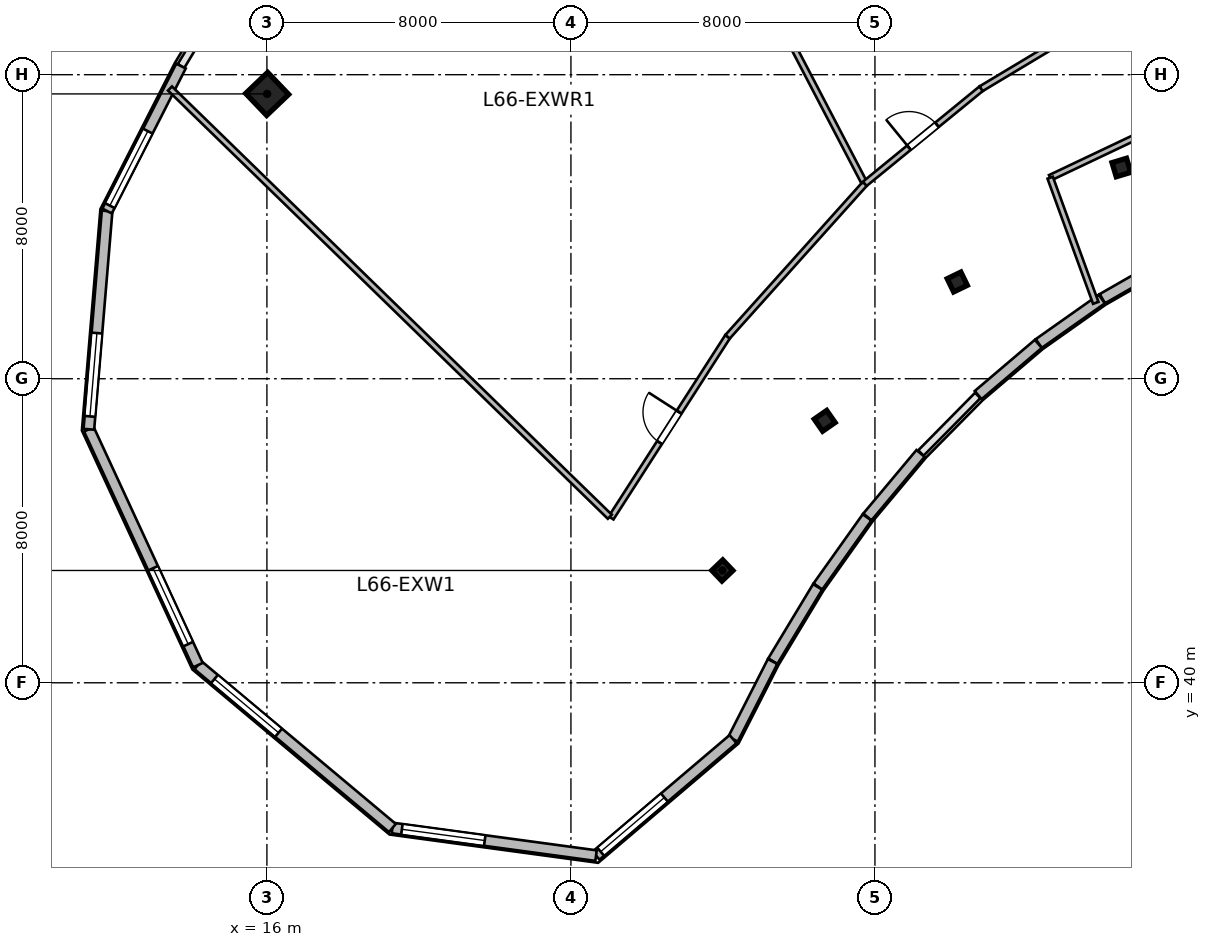
"""IFC4 building model, lengths in metres.
Left out: names, types, materials, properties, quantities, classifications, styles, units other than length and angle.
Written with IfcOpenShell. Run it as: python <this file> out.ifc"""

import sys

from ifc_helpers import new_model, si_unit, direction, frame, frame_2d, origin, origin_2d, place, context, subcontext, project, spatial, rectangle, i_section, extrude, source, transform, mapped, element, fill, save


model = new_model("IFC4")
c1 = context("Model", 3, precision=1e-05, world=origin(), true_north=direction((0.0, 1.0)))
c2 = subcontext(c1, "Body", "Model", "MODEL_VIEW")
j1 = project(units=[si_unit("LENGTHUNIT", "METRE"), si_unit("PLANEANGLEUNIT", "RADIAN")], contexts=[c1])
p1 = place(None, origin())
s1 = spatial("IfcSite", under=j1, at=p1, CompositionType="ELEMENT")
p2 = place(p1, origin())
s2 = spatial("IfcBuilding", under=s1, at=p2, CompositionType="ELEMENT")
p3 = place(p2, frame((0.0, 0.0, 271.8)))
s3 = spatial("IfcBuildingStorey", under=s2, at=p3, CompositionType="ELEMENT", Elevation=271.8)
m1 = source(origin(), c2, "Body", "SweptSolid", [
    extrude(i_section(OverallWidth=0.399, OverallDepth=0.387, WebThickness=0.021, FlangeThickness=0.033, at=origin_2d()), origin(), (0.0, 0.0, 1.0), 3.9),
])
p4 = place(p3, frame((27.985, 42.955, 0.0), z_axis=(0.0, 0.0, 1.0), x_axis=(-0.690756218984, 0.723087716626, 0.0)))
e1 = element("IfcColumn", 1, at=p4, inside=s3, PredefinedType="COLUMN", context=c2, shape_type="MappedRepresentation", body=[
    mapped(m1, transform((0.0, 0.0, 0.0), scale=1.0)),
])
m2 = source(origin(), c2, "Body", "SweptSolid", [
    extrude(rectangle(XDim=0.8, YDim=0.8, at=origin_2d()), origin(), (0.0, 0.0, 1.0), 3.9),
])
p5 = place(p3, frame((16.007, 55.494, 0.0), z_axis=(0.0, 0.0, 1.0), x_axis=(-0.690756218984, 0.723087716626, 0.0)))
e2 = element("IfcColumn", 2, at=p5, inside=s3, PredefinedType="COLUMN", context=c2, shape_type="MappedRepresentation", body=[
    mapped(m2, transform((0.0, 0.0, 0.0), scale=1.0)),
])
for number, where, z_axis, x_axis in (
    (3, (30.677, 46.892, 0.0), (0.0, 0.0, 1.0), (-0.571, 0.821, 0.0)),
    (4, (34.166, 50.545, 0.0), (0.0, 0.0, 1.0), (-0.436, 0.9, 0.0)),
    (5, (38.485, 53.558, 0.0), (0.0, 0.0, 1.0), (-0.289, 0.957, 0.0)),
):
    element("IfcColumn", number, at=place(p3, frame(where, z_axis=z_axis, x_axis=x_axis)), inside=s3, PredefinedType="COLUMN", context=c2, shape_type="MappedRepresentation", body=[
        mapped(m1, transform((0.0, 0.0, 0.0), scale=1.0)),
    ])
m3 = source(origin(), c2, "Body", "SweptSolid", [
    extrude(rectangle(XDim=1.986, YDim=0.28, at=frame_2d((0.993, 0.0))), origin(), (0.0, 0.0, 1.0), 3.64),
])
p6 = place(p3, frame((39.708, 51.093, 0.0), z_axis=(0.0, 0.0, 1.0), x_axis=(-0.867940364671, -0.496668423976, 0.0)))
e6 = element("IfcWall", 6, at=p6, inside=s3, PredefinedType="SOLIDWALL", context=c2, shape_type="MappedRepresentation", body=[
    mapped(m3, transform((0.0, 0.0, 0.0), scale=1.0)),
])
m4 = source(origin(), c2, "Body", "SweptSolid", [
    extrude(rectangle(XDim=2.03, YDim=0.28, at=frame_2d((1.015, 0.0))), origin(), (0.0, 0.0, 1.0), 3.64),
])
p7 = place(p3, frame((37.969, 50.097, 0.0), z_axis=(0.0, 0.0, 1.0), x_axis=(-0.816987864272, -0.576654861796, 0.0)))
e7 = element("IfcWall", 7, at=p7, inside=s3, PredefinedType="SOLIDWALL", context=c2, shape_type="MappedRepresentation", body=[
    mapped(m4, transform((0.0, 0.0, 0.0), scale=1.0)),
])
m5 = source(origin(), c2, "Body", "SweptSolid", [
    extrude(rectangle(XDim=2.078, YDim=0.28, at=frame_2d((1.039, 0.0))), origin(), (0.0, 0.0, 1.0), 3.64),
])
p8 = place(p3, frame((36.298, 48.917, 0.0), z_axis=(0.0, 0.0, 1.0), x_axis=(-0.761475215802, -0.648194026291, 0.0)))
e8 = element("IfcWall", 8, at=p8, inside=s3, PredefinedType="SOLIDWALL", context=c2, shape_type="MappedRepresentation", body=[
    mapped(m5, transform((0.0, 0.0, 0.0), scale=1.0)),
])
m6 = source(origin(), c2, "Body", "SweptSolid", [
    extrude(rectangle(XDim=2.18, YDim=0.28, at=frame_2d((1.09, 0.0))), origin(), (0.0, 0.0, 1.0), 3.64),
])
p9 = place(p3, frame((33.2, 46.035, 0.0), z_axis=(0.0, 0.0, 1.0), x_axis=(-0.641835571889, -0.766842290603, 0.0)))
e9 = element("IfcWall", 9, at=p9, inside=s3, PredefinedType="SOLIDWALL", context=c2, shape_type="MappedRepresentation", body=[
    mapped(m6, transform((0.0, 0.0, 0.0), scale=1.0)),
])
m7 = source(origin(), c2, "Body", "SweptSolid", [
    extrude(rectangle(XDim=2.231, YDim=0.28, at=frame_2d((1.116, 0.0))), origin(), (0.0, 0.0, 1.0), 3.64),
])
p10 = place(p3, frame((31.792, 44.352, 0.0), z_axis=(0.0, 0.0, 1.0), x_axis=(-0.579622296598, -0.814885263879, 0.0)))
e10 = element("IfcWall", 10, at=p10, inside=s3, PredefinedType="SOLIDWALL", context=c2, shape_type="MappedRepresentation", body=[
    mapped(m7, transform((0.0, 0.0, 0.0), scale=1.0)),
])
m8 = source(origin(), c2, "Body", "SweptSolid", [
    extrude(rectangle(XDim=2.281, YDim=0.28, at=frame_2d((1.14, 0.0))), origin(), (0.0, 0.0, 1.0), 3.64),
])
p11 = place(p3, frame((30.492, 42.523, 0.0), z_axis=(0.0, 0.0, 1.0), x_axis=(-0.516917942662, -0.856034952881, 0.0)))
e11 = element("IfcWall", 11, at=p11, inside=s3, PredefinedType="SOLIDWALL", context=c2, shape_type="MappedRepresentation", body=[
    mapped(m8, transform((0.0, 0.0, 0.0), scale=1.0)),
])
m9 = source(origin(), c2, "Body", "SweptSolid", [
    extrude(rectangle(XDim=2.292, YDim=0.28, at=frame_2d((1.146, 0.0))), origin(), (0.0, 0.0, 1.0), 3.64),
])
p12 = place(p3, frame((29.306, 40.559, 0.0), z_axis=(0.0, 0.0, 1.0), x_axis=(-0.453933760778, -0.891035431858, 0.0)))
e12 = element("IfcWall", 12, at=p12, inside=s3, PredefinedType="SOLIDWALL", context=c2, shape_type="MappedRepresentation", body=[
    mapped(m9, transform((0.0, 0.0, 0.0), scale=1.0)),
])
m10 = source(origin(), c2, "Body", "SweptSolid", [
    extrude(rectangle(XDim=4.732, YDim=0.28, at=frame_2d((2.366, 0.0))), origin(), (0.0, 0.0, 1.0), 3.64),
])
p13 = place(p3, frame((28.266, 38.517, 0.0), z_axis=(0.0, 0.0, 1.0), x_axis=(-0.761912583238, -0.647679871158, 0.0)))
e13 = element("IfcWall", 13, at=p13, inside=s3, PredefinedType="SOLIDWALL", context=c2, shape_type="MappedRepresentation", body=[
    mapped(m10, transform((0.0, 0.0, 0.0), scale=1.0)),
])
p14 = place(p13, frame((2.372, 0.0, 0.95)))
e14 = element("IfcOpeningElement", 14, at=p14, cuts=e13, PredefinedType="OPENING", context=c2, shape_type="SweptSolid", body=[
    extrude(rectangle(XDim=2.2, YDim=2.1, at=frame_2d((1.1, 1.05))), frame((0.0, 0.15, 0.0), z_axis=(0.0, -1.0, 0.0), x_axis=(1.0, 0.0, 0.0)), (0.0, 0.0, 1.0), 0.3),
])
m11 = source(origin(), c2, "Body", "SweptSolid", [
    extrude(rectangle(XDim=5.408, YDim=0.28, at=frame_2d((2.704, 0.0))), origin(), (0.0, 0.0, 1.0), 3.64),
])
p15 = place(p3, frame((24.661, 35.452, 0.0), z_axis=(0.0, 0.0, 1.0), x_axis=(-0.990932903229, 0.134357661853, 0.0)))
e15 = element("IfcWall", 15, at=p15, inside=s3, PredefinedType="SOLIDWALL", context=c2, shape_type="MappedRepresentation", body=[
    mapped(m11, transform((0.0, 0.0, 0.0), scale=1.0)),
])
p16 = place(p15, frame((2.956, 0.0, 0.95)))
e16 = element("IfcOpeningElement", 16, at=p16, cuts=e15, PredefinedType="OPENING", context=c2, shape_type="SweptSolid", body=[
    extrude(rectangle(XDim=2.2, YDim=2.1, at=frame_2d((1.1, 1.05))), frame((0.0, 0.15, 0.0), z_axis=(0.0, -1.0, 0.0), x_axis=(1.0, 0.0, 0.0)), (0.0, 0.0, 1.0), 0.3),
])
m12 = source(origin(), c2, "Body", "SweptSolid", [
    extrude(rectangle(XDim=6.675, YDim=0.28, at=frame_2d((3.338, 0.0))), origin(), (0.0, 0.0, 1.0), 3.64),
])
p17 = place(p3, frame((19.302, 36.179, 0.0), z_axis=(0.0, 0.0, 1.0), x_axis=(-0.766726273546, 0.641974159491, 0.0)))
e17 = element("IfcWall", 17, at=p17, inside=s3, PredefinedType="SOLIDWALL", context=c2, shape_type="MappedRepresentation", body=[
    mapped(m12, transform((0.0, 0.0, 0.0), scale=1.0)),
])
p18 = place(p17, frame((3.906, 0.0, 0.95)))
e18 = element("IfcOpeningElement", 18, at=p18, cuts=e17, PredefinedType="OPENING", context=c2, shape_type="SweptSolid", body=[
    extrude(rectangle(XDim=2.2, YDim=2.1, at=frame_2d((1.1, 1.05))), frame((0.0, 0.15, 0.0), z_axis=(0.0, -1.0, 0.0), x_axis=(1.0, 0.0, 0.0)), (0.0, 0.0, 1.0), 0.3),
])
m13 = source(origin(), c2, "Body", "SweptSolid", [
    extrude(rectangle(XDim=6.837, YDim=0.28, at=frame_2d((3.418, 0.0))), origin(), (0.0, 0.0, 1.0), 3.64),
])
p19 = place(p3, frame((14.184, 40.464, 0.0), z_axis=(0.0, 0.0, 1.0), x_axis=(-0.419621957862, 0.907698965781, 0.0)))
e19 = element("IfcWall", 19, at=p19, inside=s3, PredefinedType="SOLIDWALL", context=c2, shape_type="MappedRepresentation", body=[
    mapped(m13, transform((0.0, 0.0, 0.0), scale=1.0)),
])
p20 = place(p19, frame((0.609, 0.0, 0.95)))
e20 = element("IfcOpeningElement", 20, at=p20, cuts=e19, PredefinedType="OPENING", context=c2, shape_type="SweptSolid", body=[
    extrude(rectangle(XDim=2.2, YDim=2.1, at=frame_2d((1.1, 1.05))), frame((0.0, 0.15, 0.0), z_axis=(0.0, -1.0, 0.0), x_axis=(1.0, 0.0, 0.0)), (0.0, 0.0, 1.0), 0.3),
])
m14 = source(origin(), c2, "Body", "SweptSolid", [
    extrude(rectangle(XDim=5.763, YDim=0.28, at=frame_2d((2.881, 0.0))), origin(), (0.0, 0.0, 1.0), 3.64),
])
p21 = place(p3, frame((11.315, 46.67, 0.0), z_axis=(0.0, 0.0, 1.0), x_axis=(0.083290906041, 0.996525275631, 0.0)))
e21 = element("IfcWall", 21, at=p21, inside=s3, PredefinedType="SOLIDWALL", context=c2, shape_type="MappedRepresentation", body=[
    mapped(m14, transform((0.0, 0.0, 0.0), scale=1.0)),
])
p22 = place(p21, frame((0.341, 0.0, 0.95)))
e22 = element("IfcOpeningElement", 22, at=p22, cuts=e21, PredefinedType="OPENING", context=c2, shape_type="SweptSolid", body=[
    extrude(rectangle(XDim=2.2, YDim=2.1, at=frame_2d((1.1, 1.05))), frame((0.0, 0.15, 0.0), z_axis=(0.0, -1.0, 0.0), x_axis=(1.0, 0.0, 0.0)), (0.0, 0.0, 1.0), 0.3),
])
m15 = source(origin(), c2, "Body", "SweptSolid", [
    extrude(rectangle(XDim=4.281, YDim=0.28, at=frame_2d((2.141, 0.0))), origin(), (0.0, 0.0, 1.0), 3.64),
])
p23 = place(p3, frame((11.795, 52.413, 0.0), z_axis=(0.0, 0.0, 1.0), x_axis=(0.454020597637, 0.890991187903, 0.0)))
e23 = element("IfcWall", 23, at=p23, inside=s3, PredefinedType="SOLIDWALL", context=c2, shape_type="MappedRepresentation", body=[
    mapped(m15, transform((0.0, 0.0, 0.0), scale=1.0)),
])
p24 = place(p23, frame((0.16, 0.0, 0.95)))
e24 = element("IfcOpeningElement", 24, at=p24, cuts=e23, PredefinedType="OPENING", context=c2, shape_type="SweptSolid", body=[
    extrude(rectangle(XDim=2.2, YDim=2.1, at=frame_2d((1.1, 1.05))), frame((0.0, 0.15, 0.0), z_axis=(0.0, -1.0, 0.0), x_axis=(1.0, 0.0, 0.0)), (0.0, 0.0, 1.0), 0.3),
])
m16 = source(origin(), c2, "Body", "SweptSolid", [
    extrude(rectangle(XDim=6.137, YDim=0.15, at=frame_2d((3.069, 0.0))), origin(), (0.0, 0.0, 1.0), 3.64),
])
p25 = place(p3, frame((36.611, 53.29, 0.0), z_axis=(0.0, 0.0, 1.0), x_axis=(0.903442784804, 0.428708682657, 0.0)))
e25 = element("IfcWall", 25, at=p25, inside=s3, PredefinedType="PARTITIONING", context=c2, shape_type="MappedRepresentation", body=[
    mapped(m16, transform((0.0, 0.0, 0.0), scale=1.0)),
])
p26 = place(p25, frame((2.594, 0.0, 0.0)))
e26 = element("IfcOpeningElement", 26, at=p26, cuts=e25, PredefinedType="OPENING", context=c2, shape_type="SweptSolid", body=[
    extrude(rectangle(XDim=0.95, YDim=2.1, at=frame_2d((0.475, 1.05))), frame((0.0, 0.085, 0.0), z_axis=(0.0, -1.0, 0.0), x_axis=(1.0, 0.0, 0.0)), (0.0, 0.0, 1.0), 0.17),
])
m17 = source(origin(), c2, "Body", "SweptSolid", [
    extrude(rectangle(XDim=3.505, YDim=0.15, at=frame_2d((1.752, 0.0))), origin(), (0.0, 0.0, 1.0), 3.64),
])
p27 = place(p3, frame((37.81, 49.997, 0.0), z_axis=(0.0, 0.0, 1.0), x_axis=(-0.342045087719, 0.939683541394, 0.0)))
e27 = element("IfcWall", 27, at=p27, inside=s3, PredefinedType="PARTITIONING", context=c2, shape_type="MappedRepresentation", body=[
    mapped(m17, transform((0.0, 0.0, 0.0), scale=1.0)),
])
m18 = source(origin(), c2, "Body", "SweptSolid", [
    extrude(rectangle(XDim=5.668, YDim=0.15, at=frame_2d((2.834, 0.0))), origin(), (0.0, 0.0, 1.0), 3.64),
])
p28 = place(p3, frame((25.056, 44.337, 0.0), z_axis=(0.0, 0.0, 1.0), x_axis=(0.540868603668, 0.841107099938, 0.0)))
e28 = element("IfcWall", 28, at=p28, inside=s3, PredefinedType="PARTITIONING", context=c2, shape_type="MappedRepresentation", body=[
    mapped(m18, transform((0.0, 0.0, 0.0), scale=1.0)),
])
p29 = place(p28, frame((2.359, 0.0, 0.0)))
e29 = element("IfcOpeningElement", 29, at=p29, cuts=e28, PredefinedType="OPENING", context=c2, shape_type="SweptSolid", body=[
    extrude(rectangle(XDim=0.95, YDim=2.1, at=frame_2d((0.475, 1.05))), frame((0.0, 0.085, 0.0), z_axis=(0.0, -1.0, 0.0), x_axis=(1.0, 0.0, 0.0)), (0.0, 0.0, 1.0), 0.17),
])
m19 = source(origin(), c2, "Body", "SweptSolid", [
    extrude(rectangle(XDim=5.407, YDim=0.15, at=frame_2d((2.704, 0.0))), origin(), (0.0, 0.0, 1.0), 3.64),
])
p30 = place(p3, frame((28.122, 49.105, 0.0), z_axis=(0.0, 0.0, 1.0), x_axis=(0.667851383423, 0.744294652447, 0.0)))
e30 = element("IfcWall", 30, at=p30, inside=s3, PredefinedType="PARTITIONING", context=c2, shape_type="MappedRepresentation", body=[
    mapped(m19, transform((0.0, 0.0, 0.0), scale=1.0)),
])
m20 = source(origin(), c2, "Body", "SweptSolid", [
    extrude(rectangle(XDim=16.154, YDim=0.15, at=frame_2d((8.077, 0.0))), origin(), (0.0, 0.0, 1.0), 3.64),
])
p31 = place(p3, frame((25.024, 44.369, 0.0), z_axis=(0.0, 0.0, 1.0), x_axis=(-0.716519492877, 0.697567069412, 0.0)))
e31 = element("IfcWall", 31, at=p31, inside=s3, PredefinedType="PARTITIONING", context=c2, shape_type="MappedRepresentation", body=[
    mapped(m20, transform((0.0, 0.0, 0.0), scale=1.0)),
])
m21 = source(origin(), c2, "Body", "SweptSolid", [
    extrude(rectangle(XDim=17.75, YDim=0.15, at=frame_2d((8.875, 0.0))), origin(), (0.0, 0.0, 1.0), 3.64),
])
p32 = place(p3, frame((31.71, 53.174, 0.0), z_axis=(0.0, 0.0, 1.0), x_axis=(-0.463130463827, 0.886290118119, 0.0)))
e32 = element("IfcWall", 32, at=p32, inside=s3, PredefinedType="PARTITIONING", context=c2, shape_type="MappedRepresentation", body=[
    mapped(m21, transform((0.0, 0.0, 0.0), scale=1.0)),
])
m22 = source(origin(), c2, "Body", "SweptSolid", [
    extrude(rectangle(XDim=3.954, YDim=0.15, at=frame_2d((1.977, 0.0))), origin(), (0.0, 0.0, 1.0), 3.64),
])
p33 = place(p3, frame((31.733, 53.13, 0.0), z_axis=(0.0, 0.0, 1.0), x_axis=(0.774345047596, 0.632763579281, 0.0)))
e33 = element("IfcWall", 33, at=p33, inside=s3, PredefinedType="PARTITIONING", context=c2, shape_type="MappedRepresentation", body=[
    mapped(m22, transform((0.0, 0.0, 0.0), scale=1.0)),
])
p34 = place(p33, frame((1.502, 0.0, 0.0)))
e34 = element("IfcOpeningElement", 34, at=p34, cuts=e33, PredefinedType="OPENING", context=c2, shape_type="SweptSolid", body=[
    extrude(rectangle(XDim=0.95, YDim=2.1, at=frame_2d((0.475, 1.05))), frame((0.0, 0.085, 0.0), z_axis=(0.0, -1.0, 0.0), x_axis=(1.0, 0.0, 0.0)), (0.0, 0.0, 1.0), 0.17),
])
m23 = source(origin(), c2, "Body", "SweptSolid", [
    extrude(rectangle(XDim=3.817, YDim=0.15, at=frame_2d((1.909, 0.0))), origin(), (0.0, 0.0, 1.0), 3.64),
])
p35 = place(p3, frame((34.795, 55.632, 0.0), z_axis=(0.0, 0.0, 1.0), x_axis=(0.857453418218, 0.514561595522, 0.0)))
e35 = element("IfcWall", 35, at=p35, inside=s3, PredefinedType="PARTITIONING", context=c2, shape_type="MappedRepresentation", body=[
    mapped(m23, transform((0.0, 0.0, 0.0), scale=1.0)),
])
m24 = source(origin(), c2, "Body", "SweptSolid", [
    extrude(rectangle(XDim=2.2, YDim=2.1, at=frame_2d((1.1, 1.05))), frame((0.0, 0.03, 0.0), z_axis=(0.0, -1.0, 0.0), x_axis=(1.0, 0.0, 0.0)), (0.0, 0.0, 1.0), 0.06),
])
p36 = place(p14, origin())
e36 = element("IfcWindow", 36, at=p36, inside=s3, PartitioningType="TRIPLE_PANEL_VERTICAL", PredefinedType="WINDOW", context=c2, shape_type="MappedRepresentation", body=[
    mapped(m24, transform((0.0, 0.0, 0.0), scale=1.0)),
])
fill(e14, e36)
p37 = place(p16, origin())
e37 = element("IfcWindow", 37, at=p37, inside=s3, PartitioningType="TRIPLE_PANEL_VERTICAL", PredefinedType="WINDOW", context=c2, shape_type="MappedRepresentation", body=[
    mapped(m24, transform((0.0, 0.0, 0.0), scale=1.0)),
])
fill(e16, e37)
p38 = place(p18, origin())
e38 = element("IfcWindow", 38, at=p38, inside=s3, PartitioningType="TRIPLE_PANEL_VERTICAL", PredefinedType="WINDOW", context=c2, shape_type="MappedRepresentation", body=[
    mapped(m24, transform((0.0, 0.0, 0.0), scale=1.0)),
])
fill(e18, e38)
p39 = place(p20, origin())
e39 = element("IfcWindow", 39, at=p39, inside=s3, PartitioningType="TRIPLE_PANEL_VERTICAL", PredefinedType="WINDOW", context=c2, shape_type="MappedRepresentation", body=[
    mapped(m24, transform((0.0, 0.0, 0.0), scale=1.0)),
])
fill(e20, e39)
p40 = place(p22, origin())
e40 = element("IfcWindow", 40, at=p40, inside=s3, PartitioningType="TRIPLE_PANEL_VERTICAL", PredefinedType="WINDOW", context=c2, shape_type="MappedRepresentation", body=[
    mapped(m24, transform((0.0, 0.0, 0.0), scale=1.0)),
])
fill(e22, e40)
p41 = place(p24, origin())
e41 = element("IfcWindow", 41, at=p41, inside=s3, PartitioningType="TRIPLE_PANEL_VERTICAL", PredefinedType="WINDOW", context=c2, shape_type="MappedRepresentation", body=[
    mapped(m24, transform((0.0, 0.0, 0.0), scale=1.0)),
])
fill(e24, e41)
m25 = source(origin(), c2, "Body", "SweptSolid", [
    extrude(rectangle(XDim=0.95, YDim=2.1, at=frame_2d((0.475, 1.05))), frame((0.0, 0.025, 0.0), z_axis=(0.0, -1.0, 0.0), x_axis=(1.0, 0.0, 0.0)), (0.0, 0.0, 1.0), 0.05),
])
p42 = place(p29, origin())
e42 = element("IfcDoor", 42, at=p42, inside=s3, OperationType="SINGLE_SWING_RIGHT", PredefinedType="DOOR", context=c2, shape_type="MappedRepresentation", body=[
    mapped(m25, transform((0.0, 0.0, 0.0), scale=1.0)),
])
fill(e29, e42)
p43 = place(p34, origin())
e43 = element("IfcDoor", 43, at=p43, inside=s3, OperationType="SINGLE_SWING_LEFT", PredefinedType="DOOR", context=c2, shape_type="MappedRepresentation", body=[
    mapped(m25, transform((0.0, 0.0, 0.0), scale=1.0)),
])
fill(e34, e43)
save(model, sys.argv[1])
